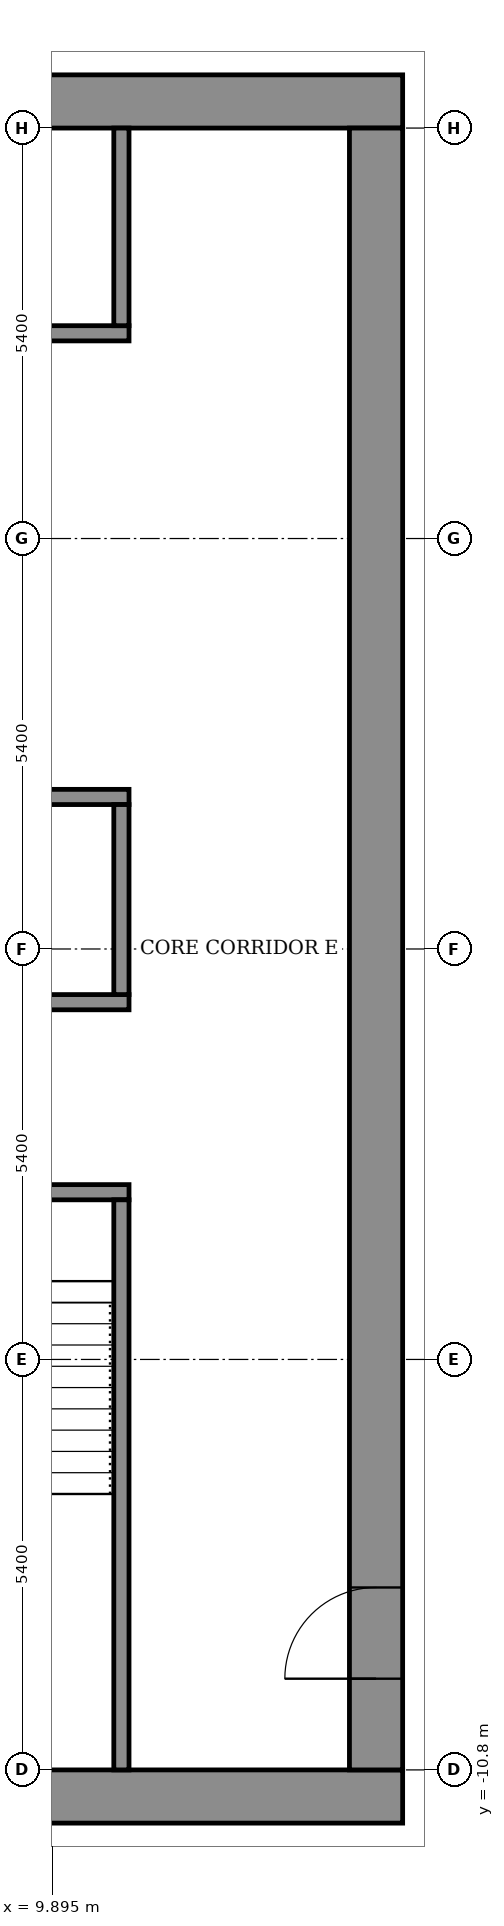
"""IFC4 building model, lengths in metres.
Left out: names, types, materials, properties, quantities, classifications, styles, units other than length and angle.
Written with IfcOpenShell. Run it as: python <this file> out.ifc"""

import sys

from ifc_helpers import new_model, si_unit, direction, frame, frame_2d, origin, place, context, subcontext, project, spatial, rectangle, extrude, element, fill, save


model = new_model("IFC4")
c1 = context("Model", 3, precision=1e-05, world=origin(), true_north=direction((0.0, 1.0)))
c2 = subcontext(c1, "Body", "Model", "MODEL_VIEW")
j1 = project(units=[si_unit("LENGTHUNIT", "METRE"), si_unit("PLANEANGLEUNIT", "RADIAN")], contexts=[c1])
p1 = place(None, origin())
s1 = spatial("IfcSite", under=j1, at=p1, CompositionType="ELEMENT")
p2 = place(p1, origin())
s2 = spatial("IfcBuilding", under=s1, at=p2, CompositionType="ELEMENT")
p3 = place(p2, frame((0.0, 0.0, 268.1)))
s3 = spatial("IfcBuildingStorey", under=s2, at=p3, CompositionType="ELEMENT", Elevation=268.1)
for number, where, z_axis, x_axis in (
    (1, (-14.5, -11.15, 0.0), (0.0, 0.0, 1.0), (1.0, 0.0, 0.0)),
    (2, (-14.5, 11.15, 0.0), (0.0, 0.0, 1.0), (1.0, 0.0, 0.0)),
):
    element("IfcWall", number, at=place(p3, frame(where, z_axis=z_axis, x_axis=x_axis)), inside=s3, PredefinedType="SHEAR", context=c2, shape_type="SweptSolid", body=[
        extrude(rectangle(XDim=29.0, YDim=0.7, at=frame_2d((14.5, 0.0))), origin(), (0.0, 0.0, 1.0), 3.6),
    ])
p4 = place(p3, frame((14.15, -10.8, 0.0), z_axis=(0.0, 0.0, 1.0), x_axis=(0.0, 1.0, 0.0)))
e3 = element("IfcWall", 3, at=p4, inside=s3, PredefinedType="SHEAR", context=c2, shape_type="SweptSolid", body=[
    extrude(rectangle(XDim=21.6, YDim=0.7, at=frame_2d((10.8, 0.0))), origin(), (0.0, 0.0, 1.0), 3.6),
])
p5 = place(p4, frame((1.2, 0.0, 0.0)))
e4 = element("IfcOpeningElement", 4, at=p5, cuts=e3, PredefinedType="OPENING", context=c2, shape_type="SweptSolid", body=[
    extrude(rectangle(XDim=1.2, YDim=2.1, at=frame_2d((0.6, 1.05))), frame((0.0, 0.36, 0.0), z_axis=(0.0, -1.0, 0.0), x_axis=(1.0, 0.0, 0.0)), (0.0, 0.0, 1.0), 0.72),
])
p6 = place(p3, frame((-10.9, -3.2, 0.0), z_axis=(0.0, 0.0, 1.0), x_axis=(1.0, 0.0, 0.0)))
e5 = element("IfcWall", 5, at=p6, inside=s3, PredefinedType="SHEAR", context=c2, shape_type="SweptSolid", body=[
    extrude(rectangle(XDim=21.8, YDim=0.2, at=frame_2d((10.9, 0.0))), origin(), (0.0, 0.0, 1.0), 3.05),
])
p7 = place(p6, frame((1.075, 0.0, 0.0)))
e6 = element("IfcOpeningElement", 6, at=p7, cuts=e5, PredefinedType="OPENING", context=c2, shape_type="SweptSolid", body=[
    extrude(rectangle(XDim=1.1, YDim=2.1, at=frame_2d((0.55, 1.05))), frame((0.0, 0.11, 0.0), z_axis=(0.0, -1.0, 0.0), x_axis=(1.0, 0.0, 0.0)), (0.0, 0.0, 1.0), 0.22),
])
p8 = place(p6, frame((10.325, 0.0, 0.0)))
e7 = element("IfcOpeningElement", 7, at=p8, cuts=e5, PredefinedType="OPENING", context=c2, shape_type="SweptSolid", body=[
    extrude(rectangle(XDim=1.1, YDim=2.1, at=frame_2d((0.55, 1.05))), frame((0.0, 0.11, 0.0), z_axis=(0.0, -1.0, 0.0), x_axis=(1.0, 0.0, 0.0)), (0.0, 0.0, 1.0), 0.22),
])
p9 = place(p6, frame((19.625, 0.0, 0.0)))
e8 = element("IfcOpeningElement", 8, at=p9, cuts=e5, PredefinedType="OPENING", context=c2, shape_type="SweptSolid", body=[
    extrude(rectangle(XDim=1.1, YDim=2.1, at=frame_2d((0.55, 1.05))), frame((0.0, 0.11, 0.0), z_axis=(0.0, -1.0, 0.0), x_axis=(1.0, 0.0, 0.0)), (0.0, 0.0, 1.0), 0.22),
])
p10 = place(p6, frame((5.7, 0.0, 0.0)))
e9 = element("IfcOpeningElement", 9, at=p10, cuts=e5, PredefinedType="OPENING", context=c2, shape_type="SweptSolid", body=[
    extrude(rectangle(XDim=1.1, YDim=2.1, at=frame_2d((0.55, 1.05))), frame((0.0, 0.11, 0.0), z_axis=(0.0, -1.0, 0.0), x_axis=(1.0, 0.0, 0.0)), (0.0, 0.0, 1.0), 0.22),
])
p11 = place(p6, frame((14.975, 0.0, 0.0)))
e10 = element("IfcOpeningElement", 10, at=p11, cuts=e5, PredefinedType="OPENING", context=c2, shape_type="SweptSolid", body=[
    extrude(rectangle(XDim=1.1, YDim=2.1, at=frame_2d((0.55, 1.05))), frame((0.0, 0.11, 0.0), z_axis=(0.0, -1.0, 0.0), x_axis=(1.0, 0.0, 0.0)), (0.0, 0.0, 1.0), 0.22),
])
p12 = place(p3, frame((-10.9, -0.7, 0.0), z_axis=(0.0, 0.0, 1.0), x_axis=(1.0, 0.0, 0.0)))
e11 = element("IfcWall", 11, at=p12, inside=s3, PredefinedType="SHEAR", context=c2, shape_type="SweptSolid", body=[
    extrude(rectangle(XDim=21.8, YDim=0.2, at=frame_2d((10.9, 0.0))), origin(), (0.0, 0.0, 1.0), 3.05),
])
p13 = place(p3, frame((-10.9, 2.0, 0.0), z_axis=(0.0, 0.0, 1.0), x_axis=(1.0, 0.0, 0.0)))
e12 = element("IfcWall", 12, at=p13, inside=s3, PredefinedType="SHEAR", context=c2, shape_type="SweptSolid", body=[
    extrude(rectangle(XDim=21.8, YDim=0.2, at=frame_2d((10.9, 0.0))), origin(), (0.0, 0.0, 1.0), 3.05),
])
p14 = place(p13, frame((4.95, 0.0, 0.0)))
e13 = element("IfcOpeningElement", 13, at=p14, cuts=e12, PredefinedType="OPENING", context=c2, shape_type="SweptSolid", body=[
    extrude(rectangle(XDim=1.1, YDim=2.1, at=frame_2d((0.55, 1.05))), frame((0.0, 0.11, 0.0), z_axis=(0.0, -1.0, 0.0), x_axis=(1.0, 0.0, 0.0)), (0.0, 0.0, 1.0), 0.22),
])
p15 = place(p13, frame((7.65, 0.0, 0.0)))
e14 = element("IfcOpeningElement", 14, at=p15, cuts=e12, PredefinedType="OPENING", context=c2, shape_type="SweptSolid", body=[
    extrude(rectangle(XDim=1.1, YDim=2.1, at=frame_2d((0.55, 1.05))), frame((0.0, 0.11, 0.0), z_axis=(0.0, -1.0, 0.0), x_axis=(1.0, 0.0, 0.0)), (0.0, 0.0, 1.0), 0.22),
])
p16 = place(p13, frame((10.35, 0.0, 0.0)))
e15 = element("IfcOpeningElement", 15, at=p16, cuts=e12, PredefinedType="OPENING", context=c2, shape_type="SweptSolid", body=[
    extrude(rectangle(XDim=1.1, YDim=2.1, at=frame_2d((0.55, 1.05))), frame((0.0, 0.11, 0.0), z_axis=(0.0, -1.0, 0.0), x_axis=(1.0, 0.0, 0.0)), (0.0, 0.0, 1.0), 0.22),
])
p17 = place(p13, frame((1.675, 0.0, 0.0)))
e16 = element("IfcOpeningElement", 16, at=p17, cuts=e12, PredefinedType="OPENING", context=c2, shape_type="SweptSolid", body=[
    extrude(rectangle(XDim=0.9, YDim=2.1, at=frame_2d((0.45, 1.05))), frame((0.0, 0.11, 0.0), z_axis=(0.0, -1.0, 0.0), x_axis=(1.0, 0.0, 0.0)), (0.0, 0.0, 1.0), 0.22),
])
p18 = place(p13, frame((13.825, 0.0, 0.0)))
e17 = element("IfcOpeningElement", 17, at=p18, cuts=e12, PredefinedType="OPENING", context=c2, shape_type="SweptSolid", body=[
    extrude(rectangle(XDim=0.9, YDim=2.1, at=frame_2d((0.45, 1.05))), frame((0.0, 0.11, 0.0), z_axis=(0.0, -1.0, 0.0), x_axis=(1.0, 0.0, 0.0)), (0.0, 0.0, 1.0), 0.22),
])
p19 = place(p13, frame((18.55, 0.0, 0.0)))
e18 = element("IfcOpeningElement", 18, at=p19, cuts=e12, PredefinedType="OPENING", context=c2, shape_type="SweptSolid", body=[
    extrude(rectangle(XDim=0.9, YDim=2.1, at=frame_2d((0.45, 1.05))), frame((0.0, 0.11, 0.0), z_axis=(0.0, -1.0, 0.0), x_axis=(1.0, 0.0, 0.0)), (0.0, 0.0, 1.0), 0.22),
])
p20 = place(p3, frame((-10.9, 8.1, 0.0), z_axis=(0.0, 0.0, 1.0), x_axis=(1.0, 0.0, 0.0)))
e19 = element("IfcWall", 19, at=p20, inside=s3, PredefinedType="SHEAR", context=c2, shape_type="SweptSolid", body=[
    extrude(rectangle(XDim=21.8, YDim=0.2, at=frame_2d((10.9, 0.0))), origin(), (0.0, 0.0, 1.0), 3.05),
])
p21 = place(p20, frame((4.95, 0.0, 0.0)))
e20 = element("IfcOpeningElement", 20, at=p21, cuts=e19, PredefinedType="OPENING", context=c2, shape_type="SweptSolid", body=[
    extrude(rectangle(XDim=1.1, YDim=2.1, at=frame_2d((0.55, 1.05))), frame((0.0, 0.11, 0.0), z_axis=(0.0, -1.0, 0.0), x_axis=(1.0, 0.0, 0.0)), (0.0, 0.0, 1.0), 0.22),
])
p22 = place(p20, frame((7.65, 0.0, 0.0)))
e21 = element("IfcOpeningElement", 21, at=p22, cuts=e19, PredefinedType="OPENING", context=c2, shape_type="SweptSolid", body=[
    extrude(rectangle(XDim=1.1, YDim=2.1, at=frame_2d((0.55, 1.05))), frame((0.0, 0.11, 0.0), z_axis=(0.0, -1.0, 0.0), x_axis=(1.0, 0.0, 0.0)), (0.0, 0.0, 1.0), 0.22),
])
p23 = place(p20, frame((10.35, 0.0, 0.0)))
e22 = element("IfcOpeningElement", 22, at=p23, cuts=e19, PredefinedType="OPENING", context=c2, shape_type="SweptSolid", body=[
    extrude(rectangle(XDim=1.1, YDim=2.1, at=frame_2d((0.55, 1.05))), frame((0.0, 0.11, 0.0), z_axis=(0.0, -1.0, 0.0), x_axis=(1.0, 0.0, 0.0)), (0.0, 0.0, 1.0), 0.22),
])
p24 = place(p20, frame((1.675, 0.0, 0.0)))
e23 = element("IfcOpeningElement", 23, at=p24, cuts=e19, PredefinedType="OPENING", context=c2, shape_type="SweptSolid", body=[
    extrude(rectangle(XDim=0.9, YDim=2.1, at=frame_2d((0.45, 1.05))), frame((0.0, 0.11, 0.0), z_axis=(0.0, -1.0, 0.0), x_axis=(1.0, 0.0, 0.0)), (0.0, 0.0, 1.0), 0.22),
])
p25 = place(p20, frame((13.825, 0.0, 0.0)))
e24 = element("IfcOpeningElement", 24, at=p25, cuts=e19, PredefinedType="OPENING", context=c2, shape_type="SweptSolid", body=[
    extrude(rectangle(XDim=0.9, YDim=2.1, at=frame_2d((0.45, 1.05))), frame((0.0, 0.11, 0.0), z_axis=(0.0, -1.0, 0.0), x_axis=(1.0, 0.0, 0.0)), (0.0, 0.0, 1.0), 0.22),
])
p26 = place(p20, frame((18.55, 0.0, 0.0)))
e25 = element("IfcOpeningElement", 25, at=p26, cuts=e19, PredefinedType="OPENING", context=c2, shape_type="SweptSolid", body=[
    extrude(rectangle(XDim=0.9, YDim=2.1, at=frame_2d((0.45, 1.05))), frame((0.0, 0.11, 0.0), z_axis=(0.0, -1.0, 0.0), x_axis=(1.0, 0.0, 0.0)), (0.0, 0.0, 1.0), 0.22),
])
p27 = place(p3, frame((10.8, -10.8, 0.0), z_axis=(0.0, 0.0, 1.0), x_axis=(0.0, 1.0, 0.0)))
e26 = element("IfcWall", 26, at=p27, inside=s3, PredefinedType="SHEAR", context=c2, shape_type="SweptSolid", body=[
    extrude(rectangle(XDim=7.5, YDim=0.2, at=frame_2d((3.75, 0.0))), origin(), (0.0, 0.0, 1.0), 3.05),
])
p28 = place(p3, frame((10.8, -0.6, 0.0), z_axis=(0.0, 0.0, 1.0), x_axis=(0.0, 1.0, 0.0)))
e27 = element("IfcWall", 27, at=p28, inside=s3, PredefinedType="STANDARD", context=c2, shape_type="SweptSolid", body=[
    extrude(rectangle(XDim=2.5, YDim=0.2, at=frame_2d((1.25, 0.0))), origin(), (0.0, 0.0, 1.0), 3.05),
])
p29 = place(p3, frame((10.8, 8.2, 0.0), z_axis=(0.0, 0.0, 1.0), x_axis=(0.0, 1.0, 0.0)))
e28 = element("IfcWall", 28, at=p29, inside=s3, PredefinedType="STANDARD", context=c2, shape_type="SweptSolid", body=[
    extrude(rectangle(XDim=2.6, YDim=0.2, at=frame_2d((1.3, 0.0))), origin(), (0.0, 0.0, 1.0), 3.05),
])
p30 = place(p5, origin())
e29 = element("IfcDoor", 29, at=p30, inside=s3, OperationType="DOUBLE_DOOR_SINGLE_SWING", PredefinedType="DOOR", context=c2, shape_type="SweptSolid", body=[
    extrude(rectangle(XDim=1.2, YDim=2.1, at=frame_2d((0.6, 1.05))), frame((0.0, 0.025, 0.0), z_axis=(0.0, -1.0, 0.0), x_axis=(1.0, 0.0, 0.0)), (0.0, 0.0, 1.0), 0.05),
])
fill(e4, e29)
save(model, sys.argv[1])
